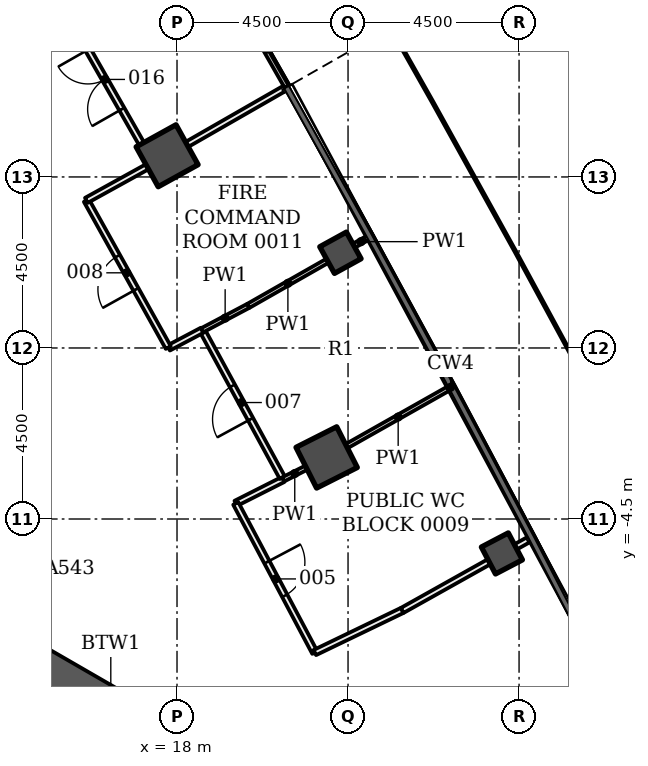
"""IFC4 building model, lengths in metres.
Left out: names, types, materials, properties, quantities, classifications, styles, units other than length and angle.
Written with IfcOpenShell. Run it as: python <this file> out.ifc"""

import sys

from ifc_helpers import new_model, si_unit, direction, frame, frame_2d, origin, origin_2d, place, context, subcontext, project, spatial, rectangle, extrude, element, fill, save


model = new_model("IFC4")
c1 = context("Model", 3, precision=1e-05, world=origin(), true_north=direction((0.0, 1.0)))
c2 = subcontext(c1, "Body", "Model", "MODEL_VIEW")
j1 = project(units=[si_unit("LENGTHUNIT", "METRE"), si_unit("PLANEANGLEUNIT", "RADIAN")], contexts=[c1])
p1 = place(None, origin())
s1 = spatial("IfcSite", under=j1, at=p1, CompositionType="ELEMENT")
p2 = place(p1, origin())
s2 = spatial("IfcBuilding", under=s1, at=p2, CompositionType="ELEMENT")
p3 = place(p2, origin())
s3 = spatial("IfcBuildingStorey", under=s2, at=p3, CompositionType="ELEMENT", Elevation=0.0)
for number, where, z_axis, x_axis in (
    (1, (21.937, -2.88, -0.25), (0.0, 0.0, 1.0), (0.893, 0.451, 0.0)),
    (2, (17.739, 5.058, -0.25), (0.0, 0.0, 1.0), (0.875, 0.484, 0.0)),
):
    element("IfcColumn", number, at=place(p3, frame(where, z_axis=z_axis, x_axis=x_axis)), inside=s3, PredefinedType="COLUMN", context=c2, shape_type="SweptSolid", body=[
        extrude(rectangle(XDim=1.2, YDim=1.2, at=origin_2d()), origin(), (0.0, 0.0, 1.0), 6.0),
    ])
for number, where, z_axis, x_axis in (
    (3, (26.548, -5.406, -0.25), (0.0, 0.0, 1.0), (0.886, 0.464, 0.0)),
    (4, (22.3, 2.506, -0.25), (0.0, 0.0, 1.0), (0.876, 0.482, 0.0)),
):
    element("IfcColumn", number, at=place(p3, frame(where, z_axis=z_axis, x_axis=x_axis)), inside=s3, PredefinedType="COLUMN", context=c2, shape_type="SweptSolid", body=[
        extrude(rectangle(XDim=0.8, YDim=0.8, at=origin_2d()), origin(), (0.0, 0.0, 1.0), 6.0),
    ])
p4 = place(p3, frame((9.922, -5.728, -0.25), z_axis=(0.0, 0.0, 1.0), x_axis=(0.866028046028, -0.499995423472, 0.0)))
e5 = element("IfcWall", 5, at=p4, inside=s3, PredefinedType="SHEAR", context=c2, shape_type="SweptSolid", body=[
    extrude(rectangle(XDim=14.633, YDim=0.9, at=frame_2d((7.316, 0.0))), origin(), (0.0, 0.0, 1.0), 6.0),
])
p5 = place(p3, frame((18.661, 10.772, 0.0), z_axis=(0.0, 0.0, 1.0), x_axis=(0.495501388328, -0.868607146048, 0.0)))
e6 = element("IfcWall", 6, at=p5, inside=s3, PredefinedType="NOTDEFINED", context=c2, shape_type="SweptSolid", body=[
    extrude(rectangle(XDim=4.496, YDim=0.12, at=frame_2d((2.248, 0.0))), origin(), (0.0, 0.0, 1.0), 5.75),
])
p6 = place(p5, frame((1.048, 0.0, 0.0)))
e7 = element("IfcOpeningElement", 7, at=p6, cuts=e6, PredefinedType="OPENING", context=c2, shape_type="SweptSolid", body=[
    extrude(rectangle(XDim=2.4, YDim=2.4, at=frame_2d((1.2, 1.2))), frame((0.0, 0.07, 0.0), z_axis=(0.0, -1.0, 0.0), x_axis=(1.0, 0.0, 0.0)), (0.0, 0.0, 1.0), 0.14),
])
p7 = place(p3, frame((9.413, -6.61, -0.25), z_axis=(0.0, 0.0, 1.0), x_axis=(0.866018442252, -0.500012057535, 0.0)))
e8 = element("IfcWall", 8, at=p7, inside=s3, PredefinedType="SHEAR", context=c2, shape_type="SweptSolid", body=[
    extrude(rectangle(XDim=7.2, YDim=1.136, at=frame_2d((3.6, 0.0))), origin(), (0.0, 0.0, 1.0), 6.0),
])
p8 = place(p3, frame((20.793, -3.458, 0.0), z_axis=(0.0, 0.0, 1.0), x_axis=(-0.892393029741, -0.451258994891, 0.0)))
e9 = element("IfcWall", 9, at=p8, inside=s3, PredefinedType="PARTITIONING", context=c2, shape_type="SweptSolid", body=[
    extrude(rectangle(XDim=1.398, YDim=0.15, at=frame_2d((0.699, 0.0))), origin(), (0.0, 0.0, 1.0), 5.138),
])
p9 = place(p3, frame((19.545, -4.089, 0.0), z_axis=(0.0, 0.0, 1.0), x_axis=(0.468453235822, -0.88348829412, 0.0)))
e10 = element("IfcWall", 10, at=p9, inside=s3, PredefinedType="PARTITIONING", context=c2, shape_type="SweptSolid", body=[
    extrude(rectangle(XDim=4.442, YDim=0.15, at=frame_2d((2.221, 0.0))), origin(), (0.0, 0.0, 1.0), 5.138),
])
p10 = place(p9, frame((1.75, 0.0, 0.0)))
e11 = element("IfcOpeningElement", 11, at=p10, cuts=e10, PredefinedType="OPENING", context=c2, shape_type="SweptSolid", body=[
    extrude(rectangle(XDim=1.0, YDim=2.1, at=frame_2d((0.5, 1.05))), frame((0.0, 0.085, 0.0), z_axis=(0.0, -1.0, 0.0), x_axis=(1.0, 0.0, 0.0)), (0.0, 0.0, 1.0), 0.17),
])
p11 = place(p3, frame((21.626, -8.014, 0.0), z_axis=(0.0, 0.0, 1.0), x_axis=(0.90070653262, 0.4344280632, 0.0)))
e12 = element("IfcWall", 12, at=p11, inside=s3, PredefinedType="PARTITIONING", context=c2, shape_type="SweptSolid", body=[
    extrude(rectangle(XDim=2.552, YDim=0.15, at=frame_2d((1.276, 0.0))), origin(), (0.0, 0.0, 1.0), 5.138),
])
p12 = place(p3, frame((23.926, -6.905, 0.0), z_axis=(0.0, 0.0, 1.0), x_axis=(0.87242811496, 0.488742451836, 0.0)))
e13 = element("IfcWall", 13, at=p12, inside=s3, PredefinedType="PARTITIONING", context=c2, shape_type="SweptSolid", body=[
    extrude(rectangle(XDim=2.619, YDim=0.15, at=frame_2d((1.31, 0.0))), origin(), (0.0, 0.0, 1.0), 5.138),
])
p13 = place(p3, frame((26.909, -5.234, 0.0), z_axis=(0.0, 0.0, 1.0), x_axis=(0.872544760499, 0.4885341758, 0.0)))
e14 = element("IfcWall", 14, at=p13, inside=s3, PredefinedType="PARTITIONING", context=c2, shape_type="SweptSolid", body=[
    extrude(rectangle(XDim=0.43, YDim=0.15, at=frame_2d((0.215, 0.0))), origin(), (0.0, 0.0, 1.0), 5.75),
])
p14 = place(p3, frame((21.401, -3.15, 0.0), z_axis=(0.0, 0.0, 1.0), x_axis=(-0.891970083601, -0.452094425935, 0.0)))
e15 = element("IfcWall", 15, at=p14, inside=s3, PredefinedType="PARTITIONING", context=c2, shape_type="SweptSolid", body=[
    extrude(rectangle(XDim=0.679, YDim=0.12, at=frame_2d((0.34, 0.0))), origin(), (0.0, 0.0, 1.0), 5.138),
])
p15 = place(p3, frame((25.177, -1.049, 0.0), z_axis=(0.0, 0.0, 1.0), x_axis=(-0.870597816272, -0.491995368171, 0.0)))
e16 = element("IfcWall", 16, at=p15, inside=s3, PredefinedType="PARTITIONING", context=c2, shape_type="SweptSolid", body=[
    extrude(rectangle(XDim=3.12, YDim=0.12, at=frame_2d((1.56, 0.0))), origin(), (0.0, 0.0, 1.0), 5.133),
])
p16 = place(p3, frame((20.771, -3.412, 0.0), z_axis=(0.0, 0.0, 1.0), x_axis=(-0.477813137195, 0.878461499398, 0.0)))
e17 = element("IfcWall", 17, at=p16, inside=s3, PredefinedType="PARTITIONING", context=c2, shape_type="SweptSolid", body=[
    extrude(rectangle(XDim=4.414, YDim=0.15, at=frame_2d((2.207, 0.0))), origin(), (0.0, 0.0, 1.0), 5.138),
])
p17 = place(p16, frame((1.75, 0.0, 0.0)))
e18 = element("IfcOpeningElement", 18, at=p17, cuts=e17, PredefinedType="OPENING", context=c2, shape_type="SweptSolid", body=[
    extrude(rectangle(XDim=1.0, YDim=2.1, at=frame_2d((0.5, 1.05))), frame((0.0, 0.085, 0.0), z_axis=(0.0, -1.0, 0.0), x_axis=(1.0, 0.0, 0.0)), (0.0, 0.0, 1.0), 0.17),
])
p18 = place(p3, frame((18.665, 0.468, 0.0), z_axis=(0.0, 0.0, 1.0), x_axis=(-0.884024558502, -0.467440456064, 0.0)))
e19 = element("IfcWall", 19, at=p18, inside=s3, PredefinedType="PARTITIONING", context=c2, shape_type="SweptSolid", body=[
    extrude(rectangle(XDim=1.003, YDim=0.15, at=frame_2d((0.502, 0.0))), origin(), (0.0, 0.0, 1.0), 5.138),
])
p19 = place(p3, frame((17.77, 0.012, 0.0), z_axis=(0.0, 0.0, 1.0), x_axis=(-0.486499058613, 0.873681100842, 0.0)))
e20 = element("IfcWall", 20, at=p19, inside=s3, PredefinedType="PARTITIONING", context=c2, shape_type="SweptSolid", body=[
    extrude(rectangle(XDim=4.43, YDim=0.15, at=frame_2d((2.215, 0.0))), origin(), (0.0, 0.0, 1.0), 5.138),
])
p20 = place(p19, frame((1.75, 0.0, 0.0)))
e21 = element("IfcOpeningElement", 21, at=p20, cuts=e20, PredefinedType="OPENING", context=c2, shape_type="SweptSolid", body=[
    extrude(rectangle(XDim=1.0, YDim=2.1, at=frame_2d((0.5, 1.05))), frame((0.0, 0.085, 0.0), z_axis=(0.0, -1.0, 0.0), x_axis=(1.0, 0.0, 0.0)), (0.0, 0.0, 1.0), 0.17),
])
p21 = place(p3, frame((15.615, 3.884, 0.0), z_axis=(0.0, 0.0, 1.0), x_axis=(0.875240045644, 0.483688807501, 0.0)))
e22 = element("IfcWall", 22, at=p21, inside=s3, PredefinedType="PARTITIONING", context=c2, shape_type="SweptSolid", body=[
    extrude(rectangle(XDim=1.826, YDim=0.15, at=frame_2d((0.913, 0.0))), origin(), (0.0, 0.0, 1.0), 5.138),
])
p22 = place(p3, frame((17.068, 5.372, 0.0), z_axis=(0.0, 0.0, 1.0), x_axis=(-0.495535858124, 0.86858748167, 0.0)))
e23 = element("IfcWall", 23, at=p22, inside=s3, PredefinedType="PARTITIONING", context=c2, shape_type="SweptSolid", body=[
    extrude(rectangle(XDim=3.881, YDim=0.15, at=frame_2d((1.94, 0.0))), origin(), (0.0, 0.0, 1.0), 5.138),
])
p23 = place(p22, frame((1.05, 0.0, 0.0)))
e24 = element("IfcOpeningElement", 24, at=p23, cuts=e23, PredefinedType="OPENING", context=c2, shape_type="SweptSolid", body=[
    extrude(rectangle(XDim=1.8, YDim=2.1, at=frame_2d((0.9, 1.05))), frame((0.0, 0.085, 0.0), z_axis=(0.0, -1.0, 0.0), x_axis=(1.0, 0.0, 0.0)), (0.0, 0.0, 1.0), 0.17),
])
p24 = place(p3, frame((21.959, 2.295, 0.0), z_axis=(0.0, 0.0, 1.0), x_axis=(-0.868831589773, -0.49510773435, 0.0)))
e25 = element("IfcWall", 25, at=p24, inside=s3, PredefinedType="PARTITIONING", context=c2, shape_type="SweptSolid", body=[
    extrude(rectangle(XDim=2.397, YDim=0.12, at=frame_2d((1.199, 0.0))), origin(), (0.0, 0.0, 1.0), 5.138),
])
p25 = place(p3, frame((19.875, 1.108, 0.0), z_axis=(0.0, 0.0, 1.0), x_axis=(-0.883943143007, -0.467594396812, 0.0)))
e26 = element("IfcWall", 26, at=p25, inside=s3, PredefinedType="PARTITIONING", context=c2, shape_type="SweptSolid", body=[
    extrude(rectangle(XDim=1.377, YDim=0.12, at=frame_2d((0.688, 0.0))), origin(), (0.0, 0.0, 1.0), 5.138),
])
p26 = place(p3, frame((23.028, 2.904, 0.0), z_axis=(0.0, 0.0, 1.0), x_axis=(-0.868835821541, -0.495100308228, 0.0)))
e27 = element("IfcWall", 27, at=p26, inside=s3, PredefinedType="PARTITIONING", context=c2, shape_type="SweptSolid", body=[
    extrude(rectangle(XDim=0.43, YDim=0.12, at=frame_2d((0.215, 0.0))), origin(), (0.0, 0.0, 1.0), 5.75),
])
p27 = place(p3, frame((20.838, 6.835, 0.0), z_axis=(0.0, 0.0, 1.0), x_axis=(-0.867382463281, -0.497642102714, 0.0)))
e28 = element("IfcWall", 28, at=p27, inside=s3, PredefinedType="PARTITIONING", context=c2, shape_type="SweptSolid", body=[
    extrude(rectangle(XDim=2.972, YDim=0.15, at=frame_2d((1.486, 0.0))), origin(), (0.0, 0.0, 1.0), 5.133),
])
p28 = place(p6, origin())
e29 = element("IfcDoor", 29, at=p28, inside=s3, OperationType="REVOLVING", PredefinedType="DOOR", context=c2, shape_type="SweptSolid", body=[
    extrude(rectangle(XDim=2.4, YDim=2.4, at=frame_2d((1.2, 1.2))), frame((0.0, 0.025, 0.0), z_axis=(0.0, -1.0, 0.0), x_axis=(1.0, 0.0, 0.0)), (0.0, 0.0, 1.0), 0.05),
])
fill(e7, e29)
p29 = place(p10, origin())
e30 = element("IfcDoor", 30, at=p29, inside=s3, OperationType="SINGLE_SWING_RIGHT", PredefinedType="DOOR", context=c2, shape_type="SweptSolid", body=[
    extrude(rectangle(XDim=1.0, YDim=2.1, at=frame_2d((0.5, 1.05))), frame((0.0, 0.025, 0.0), z_axis=(0.0, -1.0, 0.0), x_axis=(1.0, 0.0, 0.0)), (0.0, 0.0, 1.0), 0.05),
])
fill(e11, e30)
p30 = place(p17, origin())
e31 = element("IfcDoor", 31, at=p30, inside=s3, OperationType="SINGLE_SWING_LEFT", PredefinedType="DOOR", context=c2, shape_type="SweptSolid", body=[
    extrude(rectangle(XDim=1.0, YDim=2.1, at=frame_2d((0.5, 1.05))), frame((0.0, 0.025, 0.0), z_axis=(0.0, -1.0, 0.0), x_axis=(1.0, 0.0, 0.0)), (0.0, 0.0, 1.0), 0.05),
])
fill(e18, e31)
p31 = place(p20, origin())
e32 = element("IfcDoor", 32, at=p31, inside=s3, OperationType="SINGLE_SWING_LEFT", PredefinedType="DOOR", context=c2, shape_type="SweptSolid", body=[
    extrude(rectangle(XDim=1.0, YDim=2.1, at=frame_2d((0.5, 1.05))), frame((0.0, 0.025, 0.0), z_axis=(0.0, -1.0, 0.0), x_axis=(1.0, 0.0, 0.0)), (0.0, 0.0, 1.0), 0.05),
])
fill(e21, e32)
p32 = place(p23, origin())
e33 = element("IfcDoor", 33, at=p32, inside=s3, OperationType="DOUBLE_DOOR_SINGLE_SWING", PredefinedType="DOOR", context=c2, shape_type="SweptSolid", body=[
    extrude(rectangle(XDim=1.8, YDim=2.1, at=frame_2d((0.9, 1.05))), frame((0.0, 0.025, 0.0), z_axis=(0.0, -1.0, 0.0), x_axis=(1.0, 0.0, 0.0)), (0.0, 0.0, 1.0), 0.05),
])
fill(e24, e33)
save(model, sys.argv[1])
